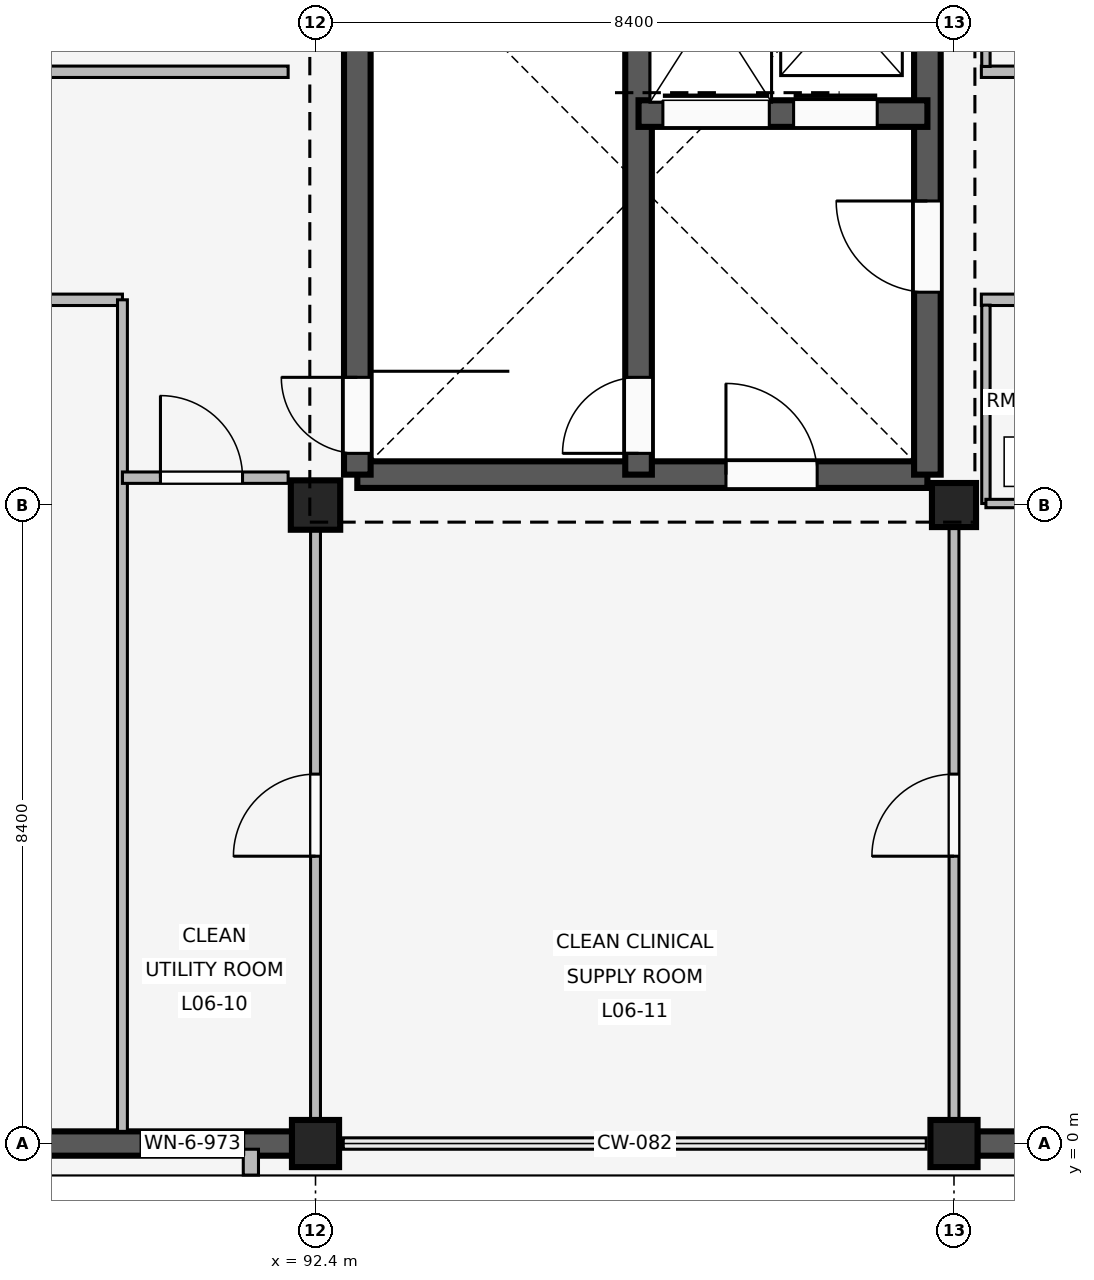
"""IFC4 building model, lengths in metres.
Left out: names, types, materials, properties, quantities, classifications, styles, units other than length and angle.
Written with IfcOpenShell. Run it as: python <this file> out.ifc"""

import sys

from ifc_helpers import new_model, si_unit, direction, frame, frame_2d, origin, origin_2d, place, context, subcontext, project, spatial, rectangle, extrude, element, fill, save


model = new_model("IFC4")
c1 = context("Model", 3, precision=1e-05, world=origin(), true_north=direction((0.0, 1.0)))
c2 = subcontext(c1, "Body", "Model", "MODEL_VIEW")
j1 = project(units=[si_unit("LENGTHUNIT", "METRE"), si_unit("PLANEANGLEUNIT", "RADIAN")], contexts=[c1])
p1 = place(None, origin())
s1 = spatial("IfcSite", under=j1, at=p1, CompositionType="ELEMENT")
p2 = place(p1, origin())
s2 = spatial("IfcBuilding", under=s1, at=p2, CompositionType="ELEMENT")
p3 = place(p2, frame((0.0, 0.0, 24.6)))
s3 = spatial("IfcBuildingStorey", under=s2, at=p3, CompositionType="ELEMENT", Elevation=24.6)
p4 = place(p3, frame((92.4, 0.0, 0.0), z_axis=(0.0, 0.0, 1.0), x_axis=(1.0, 0.0, 0.0)))
e1 = element("IfcColumn", 1, at=p4, inside=s3, PredefinedType="COLUMN", context=c2, shape_type="SweptSolid", body=[
    extrude(rectangle(XDim=0.62, YDim=0.62, at=origin_2d()), origin(), (0.0, 0.0, 1.0), 4.2),
])
p5 = place(p3, frame((92.4, 8.4, 0.0), z_axis=(0.0, 0.0, 1.0), x_axis=(1.0, 0.0, 0.0)))
e2 = element("IfcColumn", 2, at=p5, inside=s3, PredefinedType="COLUMN", context=c2, shape_type="SweptSolid", body=[
    extrude(rectangle(XDim=0.65, YDim=0.65, at=origin_2d()), origin(), (0.0, 0.0, 1.0), 4.2),
])
p6 = place(p3, frame((100.8, 0.0, 0.0), z_axis=(0.0, 0.0, 1.0), x_axis=(1.0, 0.0, 0.0)))
e3 = element("IfcColumn", 3, at=p6, inside=s3, PredefinedType="COLUMN", context=c2, shape_type="SweptSolid", body=[
    extrude(rectangle(XDim=0.62, YDim=0.62, at=origin_2d()), origin(), (0.0, 0.0, 1.0), 4.2),
])
p7 = place(p3, frame((100.8, 8.4, 0.0), z_axis=(0.0, 0.0, 1.0), x_axis=(1.0, 0.0, 0.0)))
e4 = element("IfcColumn", 4, at=p7, inside=s3, PredefinedType="COLUMN", context=c2, shape_type="SweptSolid", body=[
    extrude(rectangle(XDim=0.58, YDim=0.58, at=origin_2d()), origin(), (0.0, 0.0, 1.0), 4.2),
])
p8 = place(p3, frame((92.095, 0.0, 0.0), z_axis=(0.0, 0.0, 1.0), x_axis=(-1.0, 0.0, 0.0)))
e5 = element("IfcWall", 5, at=p8, inside=s3, PredefinedType="SOLIDWALL", context=c2, shape_type="SweptSolid", body=[
    extrude(rectangle(XDim=7.79, YDim=0.32, at=frame_2d((3.895, 0.0))), origin(), (0.0, 0.0, 1.0), 3.34),
])
p9 = place(p8, frame((0.64, 0.0, 0.85)))
e6 = element("IfcOpeningElement", 6, at=p9, cuts=e5, PredefinedType="OPENING", context=c2, shape_type="SweptSolid", body=[
    extrude(rectangle(XDim=1.35, YDim=1.55, at=frame_2d((0.675, 0.775))), frame((0.0, 0.17, 0.0), z_axis=(0.0, -1.0, 0.0), x_axis=(1.0, 0.0, 0.0)), (0.0, 0.0, 1.0), 0.34),
])
p10 = place(p8, frame((5.323, 0.0, 0.85)))
e7 = element("IfcOpeningElement", 7, at=p10, cuts=e5, PredefinedType="OPENING", context=c2, shape_type="SweptSolid", body=[
    extrude(rectangle(XDim=1.35, YDim=1.55, at=frame_2d((0.675, 0.775))), frame((0.0, 0.17, 0.0), z_axis=(0.0, -1.0, 0.0), x_axis=(1.0, 0.0, 0.0)), (0.0, 0.0, 1.0), 0.34),
])
p11 = place(p3, frame((91.55, -0.075, 0.0), z_axis=(0.0, 0.0, 1.0), x_axis=(0.0, -1.0, 0.0)))
e8 = element("IfcWall", 8, at=p11, inside=s3, PredefinedType="ELEMENTEDWALL", context=c2, shape_type="SweptSolid", body=[
    extrude(rectangle(XDim=0.34, YDim=0.2, at=frame_2d((0.17, 0.0))), origin(), (0.0, 0.0, 1.0), 3.32),
])
p12 = place(p3, frame((108.895, 0.0, 0.0), z_axis=(0.0, 0.0, 1.0), x_axis=(-1.0, 0.0, 0.0)))
e9 = element("IfcWall", 9, at=p12, inside=s3, PredefinedType="SOLIDWALL", context=c2, shape_type="SweptSolid", body=[
    extrude(rectangle(XDim=7.79, YDim=0.32, at=frame_2d((3.895, 0.0))), origin(), (0.0, 0.0, 1.0), 3.34),
])
p13 = place(p12, frame((1.417, 0.0, 0.85)))
e10 = element("IfcOpeningElement", 10, at=p13, cuts=e9, PredefinedType="OPENING", context=c2, shape_type="SweptSolid", body=[
    extrude(rectangle(XDim=0.75, YDim=1.85, at=frame_2d((0.375, 0.925))), frame((0.0, 0.17, 0.0), z_axis=(0.0, -1.0, 0.0), x_axis=(1.0, 0.0, 0.0)), (0.0, 0.0, 1.0), 0.34),
])
p14 = place(p12, frame((5.623, 0.0, 0.85)))
e11 = element("IfcOpeningElement", 11, at=p14, cuts=e9, PredefinedType="OPENING", context=c2, shape_type="SweptSolid", body=[
    extrude(rectangle(XDim=0.75, YDim=1.85, at=frame_2d((0.375, 0.925))), frame((0.0, 0.17, 0.0), z_axis=(0.0, -1.0, 0.0), x_axis=(1.0, 0.0, 0.0)), (0.0, 0.0, 1.0), 0.34),
])
p15 = place(p3, frame((92.95, 8.8, 0.0), z_axis=(0.0, 0.0, 1.0), x_axis=(1.0, 0.0, 0.0)))
e12 = element("IfcWall", 12, at=p15, inside=s3, PredefinedType="SHEAR", context=c2, shape_type="SweptSolid", body=[
    extrude(rectangle(XDim=7.5, YDim=0.35, at=frame_2d((3.75, 0.0))), origin(), (0.0, 0.0, 1.0), 3.92),
])
p16 = place(p15, frame((4.85, 0.0, 0.0)))
e13 = element("IfcOpeningElement", 13, at=p16, cuts=e12, PredefinedType="OPENING", context=c2, shape_type="SweptSolid", body=[
    extrude(rectangle(XDim=1.2, YDim=2.2, at=frame_2d((0.6, 1.1))), frame((0.0, 0.185, 0.0), z_axis=(0.0, -1.0, 0.0), x_axis=(1.0, 0.0, 0.0)), (0.0, 0.0, 1.0), 0.37),
])
p17 = place(p3, frame((92.95, 8.8, 0.0), z_axis=(0.0, 0.0, 1.0), x_axis=(0.0, 1.0, 0.0)))
e14 = element("IfcWall", 14, at=p17, inside=s3, PredefinedType="SHEAR", context=c2, shape_type="SweptSolid", body=[
    extrude(rectangle(XDim=7.55, YDim=0.35, at=frame_2d((3.775, 0.0))), origin(), (0.0, 0.0, 1.0), 3.92),
])
p18 = place(p17, frame((0.28, 0.0, 0.0)))
e15 = element("IfcOpeningElement", 15, at=p18, cuts=e14, PredefinedType="OPENING", context=c2, shape_type="SweptSolid", body=[
    extrude(rectangle(XDim=1.0, YDim=2.15, at=frame_2d((0.5, 1.075))), frame((0.0, 0.185, 0.0), z_axis=(0.0, -1.0, 0.0), x_axis=(1.0, 0.0, 0.0)), (0.0, 0.0, 1.0), 0.37),
])
p19 = place(p3, frame((100.45, 8.8, 0.0), z_axis=(0.0, 0.0, 1.0), x_axis=(0.0, 1.0, 0.0)))
e16 = element("IfcWall", 16, at=p19, inside=s3, PredefinedType="SHEAR", context=c2, shape_type="SweptSolid", body=[
    extrude(rectangle(XDim=7.55, YDim=0.35, at=frame_2d((3.775, 0.0))), origin(), (0.0, 0.0, 1.0), 3.92),
])
p20 = place(p19, frame((2.4, 0.0, 0.0)))
e17 = element("IfcOpeningElement", 17, at=p20, cuts=e16, PredefinedType="OPENING", context=c2, shape_type="SweptSolid", body=[
    extrude(rectangle(XDim=1.2, YDim=2.2, at=frame_2d((0.6, 1.1))), frame((0.0, 0.185, 0.0), z_axis=(0.0, -1.0, 0.0), x_axis=(1.0, 0.0, 0.0)), (0.0, 0.0, 1.0), 0.37),
])
p21 = place(p3, frame((96.65, 8.8, 0.0), z_axis=(0.0, 0.0, 1.0), x_axis=(0.0, 1.0, 0.0)))
e18 = element("IfcWall", 18, at=p21, inside=s3, PredefinedType="SHEAR", context=c2, shape_type="SweptSolid", body=[
    extrude(rectangle(XDim=7.55, YDim=0.35, at=frame_2d((3.775, 0.0))), origin(), (0.0, 0.0, 1.0), 3.92),
])
p22 = place(p21, frame((0.28, 0.0, 0.0)))
e19 = element("IfcOpeningElement", 19, at=p22, cuts=e18, PredefinedType="OPENING", context=c2, shape_type="SweptSolid", body=[
    extrude(rectangle(XDim=1.0, YDim=2.15, at=frame_2d((0.5, 1.075))), frame((0.0, 0.185, 0.0), z_axis=(0.0, -1.0, 0.0), x_axis=(1.0, 0.0, 0.0)), (0.0, 0.0, 1.0), 0.37),
])
p23 = place(p3, frame((96.65, 13.55, 0.0), z_axis=(0.0, 0.0, 1.0), x_axis=(1.0, 0.0, 0.0)))
e20 = element("IfcWall", 20, at=p23, inside=s3, PredefinedType="SHEAR", context=c2, shape_type="SweptSolid", body=[
    extrude(rectangle(XDim=3.8, YDim=0.35, at=frame_2d((1.9, 0.0))), origin(), (0.0, 0.0, 1.0), 3.92),
])
p24 = place(p23, frame((0.32, 0.0, 0.0)))
e21 = element("IfcOpeningElement", 21, at=p24, cuts=e20, PredefinedType="OPENING", context=c2, shape_type="SweptSolid", body=[
    extrude(rectangle(XDim=1.4, YDim=2.25, at=frame_2d((0.7, 1.125))), frame((0.0, 0.185, 0.0), z_axis=(0.0, -1.0, 0.0), x_axis=(1.0, 0.0, 0.0)), (0.0, 0.0, 1.0), 0.37),
])
p25 = place(p23, frame((2.04, 0.0, 0.0)))
e22 = element("IfcOpeningElement", 22, at=p25, cuts=e20, PredefinedType="OPENING", context=c2, shape_type="SweptSolid", body=[
    extrude(rectangle(XDim=1.1, YDim=2.15, at=frame_2d((0.55, 1.075))), frame((0.0, 0.185, 0.0), z_axis=(0.0, -1.0, 0.0), x_axis=(1.0, 0.0, 0.0)), (0.0, 0.0, 1.0), 0.37),
])
p26 = place(p3, frame((84.08, 11.1, 0.0), z_axis=(0.0, 0.0, 1.0), x_axis=(1.0, 0.0, 0.0)))
e23 = element("IfcWall", 23, at=p26, inside=s3, PredefinedType="PARTITIONING", context=c2, shape_type="SweptSolid", body=[
    extrude(rectangle(XDim=5.78, YDim=0.15, at=frame_2d((2.89, 0.0))), origin(), (0.0, 0.0, 1.0), 3.32),
])
p27 = place(p26, frame((2.38, 0.0, 0.0)))
e24 = element("IfcOpeningElement", 24, at=p27, cuts=e23, PredefinedType="OPENING", context=c2, shape_type="SweptSolid", body=[
    extrude(rectangle(XDim=1.25, YDim=2.2, at=frame_2d((0.625, 1.1))), frame((0.0, 0.085, 0.0), z_axis=(0.0, -1.0, 0.0), x_axis=(1.0, 0.0, 0.0)), (0.0, 0.0, 1.0), 0.17),
])
p28 = place(p3, frame((89.86, 0.16, 0.0), z_axis=(0.0, 0.0, 1.0), x_axis=(0.0, 1.0, 0.0)))
e25 = element("IfcWall", 25, at=p28, inside=s3, PredefinedType="PARTITIONING", context=c2, shape_type="SweptSolid", body=[
    extrude(rectangle(XDim=10.94, YDim=0.13, at=frame_2d((5.47, 0.0))), origin(), (0.0, 0.0, 1.0), 3.32),
])
p29 = place(p3, frame((89.86, 8.76, 0.0), z_axis=(0.0, 0.0, 1.0), x_axis=(1.0, 0.0, 0.0)))
e26 = element("IfcWall", 26, at=p29, inside=s3, PredefinedType="PARTITIONING", context=c2, shape_type="SweptSolid", body=[
    extrude(rectangle(XDim=2.18, YDim=0.15, at=frame_2d((1.09, 0.0))), origin(), (0.0, 0.0, 1.0), 3.32),
])
p30 = place(p29, frame((0.5, 0.0, 0.0)))
e27 = element("IfcOpeningElement", 27, at=p30, cuts=e26, PredefinedType="OPENING", context=c2, shape_type="SweptSolid", body=[
    extrude(rectangle(XDim=1.08, YDim=2.15, at=frame_2d((0.54, 1.075))), frame((0.0, 0.085, 0.0), z_axis=(0.0, -1.0, 0.0), x_axis=(1.0, 0.0, 0.0)), (0.0, 0.0, 1.0), 0.17),
])
p31 = place(p3, frame((92.04, 14.1, 0.0), z_axis=(0.0, 0.0, 1.0), x_axis=(-1.0, 0.0, 0.0)))
e28 = element("IfcWall", 28, at=p31, inside=s3, PredefinedType="PARTITIONING", context=c2, shape_type="SweptSolid", body=[
    extrude(rectangle(XDim=7.96, YDim=0.15, at=frame_2d((3.98, 0.0))), origin(), (0.0, 0.0, 1.0), 3.32),
])
p32 = place(p31, frame((3.355, 0.0, 0.0)))
e29 = element("IfcOpeningElement", 29, at=p32, cuts=e28, PredefinedType="OPENING", context=c2, shape_type="SweptSolid", body=[
    extrude(rectangle(XDim=1.25, YDim=2.2, at=frame_2d((0.625, 1.1))), frame((0.0, 0.085, 0.0), z_axis=(0.0, -1.0, 0.0), x_axis=(1.0, 0.0, 0.0)), (0.0, 0.0, 1.0), 0.17),
])
p33 = place(p3, frame((92.4, 0.14, 0.0), z_axis=(0.0, 0.0, 1.0), x_axis=(0.0, 1.0, 0.0)))
e30 = element("IfcWall", 30, at=p33, inside=s3, PredefinedType="PARTITIONING", context=c2, shape_type="SweptSolid", body=[
    extrude(rectangle(XDim=8.21, YDim=0.13, at=frame_2d((4.105, 0.0))), origin(), (0.0, 0.0, 1.0), 3.32),
])
p34 = place(p33, frame((3.64, 0.0, 0.0)))
e31 = element("IfcOpeningElement", 31, at=p34, cuts=e30, PredefinedType="OPENING", context=c2, shape_type="SweptSolid", body=[
    extrude(rectangle(XDim=1.08, YDim=2.15, at=frame_2d((0.54, 1.075))), frame((0.0, 0.075, 0.0), z_axis=(0.0, -1.0, 0.0), x_axis=(1.0, 0.0, 0.0)), (0.0, 0.0, 1.0), 0.15),
])
p35 = place(p3, frame((100.8, 0.14, 0.0), z_axis=(0.0, 0.0, 1.0), x_axis=(0.0, 1.0, 0.0)))
e32 = element("IfcWall", 32, at=p35, inside=s3, PredefinedType="PARTITIONING", context=c2, shape_type="SweptSolid", body=[
    extrude(rectangle(XDim=8.21, YDim=0.13, at=frame_2d((4.105, 0.0))), origin(), (0.0, 0.0, 1.0), 3.32),
])
p36 = place(p35, frame((3.64, 0.0, 0.0)))
e33 = element("IfcOpeningElement", 33, at=p36, cuts=e32, PredefinedType="OPENING", context=c2, shape_type="SweptSolid", body=[
    extrude(rectangle(XDim=1.08, YDim=2.15, at=frame_2d((0.54, 1.075))), frame((0.0, 0.075, 0.0), z_axis=(0.0, -1.0, 0.0), x_axis=(1.0, 0.0, 0.0)), (0.0, 0.0, 1.0), 0.15),
])
p37 = place(p3, frame((101.16, 11.1, 0.0), z_axis=(0.0, 0.0, 1.0), x_axis=(1.0, 0.0, 0.0)))
e34 = element("IfcWall", 34, at=p37, inside=s3, PredefinedType="PARTITIONING", context=c2, shape_type="SweptSolid", body=[
    extrude(rectangle(XDim=7.96, YDim=0.15, at=frame_2d((3.98, 0.0))), origin(), (0.0, 0.0, 1.0), 3.32),
])
p38 = place(p37, frame((2.25, 0.0, 0.0)))
e35 = element("IfcOpeningElement", 35, at=p38, cuts=e34, PredefinedType="OPENING", context=c2, shape_type="SweptSolid", body=[
    extrude(rectangle(XDim=1.28, YDim=2.2, at=frame_2d((0.64, 1.1))), frame((0.0, 0.085, 0.0), z_axis=(0.0, -1.0, 0.0), x_axis=(1.0, 0.0, 0.0)), (0.0, 0.0, 1.0), 0.17),
])
p39 = place(p37, frame((5.95, 0.0, 0.0)))
e36 = element("IfcOpeningElement", 36, at=p39, cuts=e34, PredefinedType="OPENING", context=c2, shape_type="SweptSolid", body=[
    extrude(rectangle(XDim=1.28, YDim=2.2, at=frame_2d((0.64, 1.1))), frame((0.0, 0.085, 0.0), z_axis=(0.0, -1.0, 0.0), x_axis=(1.0, 0.0, 0.0)), (0.0, 0.0, 1.0), 0.17),
])
p40 = place(p3, frame((101.22, 8.42, 0.0), z_axis=(0.0, 0.0, 1.0), x_axis=(0.0, 1.0, 0.0)))
e37 = element("IfcWall", 37, at=p40, inside=s3, PredefinedType="PARTITIONING", context=c2, shape_type="SweptSolid", body=[
    extrude(rectangle(XDim=2.61, YDim=0.11, at=frame_2d((1.305, 0.0))), origin(), (0.0, 0.0, 1.0), 3.32),
])
p41 = place(p3, frame((101.22, 8.42, 0.0), z_axis=(0.0, 0.0, 1.0), x_axis=(1.0, 0.0, 0.0)))
e38 = element("IfcWall", 38, at=p41, inside=s3, PredefinedType="PARTITIONING", context=c2, shape_type="SweptSolid", body=[
    extrude(rectangle(XDim=1.98, YDim=0.11, at=frame_2d((0.99, 0.0))), origin(), (0.0, 0.0, 1.0), 3.32),
])
p42 = place(p41, frame((0.54, 0.0, 0.0)))
e39 = element("IfcOpeningElement", 39, at=p42, cuts=e38, PredefinedType="OPENING", context=c2, shape_type="SweptSolid", body=[
    extrude(rectangle(XDim=0.9, YDim=2.1, at=frame_2d((0.45, 1.05))), frame((0.0, 0.065, 0.0), z_axis=(0.0, -1.0, 0.0), x_axis=(1.0, 0.0, 0.0)), (0.0, 0.0, 1.0), 0.13),
])
p43 = place(p3, frame((109.12, 14.1, 0.0), z_axis=(0.0, 0.0, 1.0), x_axis=(-1.0, 0.0, 0.0)))
e40 = element("IfcWall", 40, at=p43, inside=s3, PredefinedType="PARTITIONING", context=c2, shape_type="SweptSolid", body=[
    extrude(rectangle(XDim=7.96, YDim=0.15, at=frame_2d((3.98, 0.0))), origin(), (0.0, 0.0, 1.0), 3.32),
])
p44 = place(p43, frame((0.73, 0.0, 0.0)))
e41 = element("IfcOpeningElement", 41, at=p44, cuts=e40, PredefinedType="OPENING", context=c2, shape_type="SweptSolid", body=[
    extrude(rectangle(XDim=1.28, YDim=2.2, at=frame_2d((0.64, 1.1))), frame((0.0, 0.085, 0.0), z_axis=(0.0, -1.0, 0.0), x_axis=(1.0, 0.0, 0.0)), (0.0, 0.0, 1.0), 0.17),
])
p45 = place(p43, frame((4.43, 0.0, 0.0)))
e42 = element("IfcOpeningElement", 42, at=p45, cuts=e40, PredefinedType="OPENING", context=c2, shape_type="SweptSolid", body=[
    extrude(rectangle(XDim=1.28, YDim=2.2, at=frame_2d((0.64, 1.1))), frame((0.0, 0.085, 0.0), z_axis=(0.0, -1.0, 0.0), x_axis=(1.0, 0.0, 0.0)), (0.0, 0.0, 1.0), 0.17),
])
p46 = place(p3, frame((101.22, 14.17, 0.0), z_axis=(0.0, 0.0, 1.0), x_axis=(0.0, 1.0, 0.0)))
e43 = element("IfcWall", 43, at=p46, inside=s3, PredefinedType="PARTITIONING", context=c2, shape_type="SweptSolid", body=[
    extrude(rectangle(XDim=2.61, YDim=0.11, at=frame_2d((1.305, 0.0))), origin(), (0.0, 0.0, 1.0), 3.32),
])
p47 = place(p9, origin())
e44 = element("IfcWindow", 44, at=p47, inside=s3, PartitioningType="SINGLE_PANEL", PredefinedType="WINDOW", context=c2, shape_type="SweptSolid", body=[
    extrude(rectangle(XDim=1.35, YDim=1.55, at=frame_2d((0.675, 0.775))), frame((0.0, 0.03, 0.0), z_axis=(0.0, -1.0, 0.0), x_axis=(1.0, 0.0, 0.0)), (0.0, 0.0, 1.0), 0.06),
])
fill(e6, e44)
p48 = place(p20, origin())
e45 = element("IfcDoor", 45, at=p48, inside=s3, OperationType="SINGLE_SWING_RIGHT", PredefinedType="DOOR", context=c2, shape_type="SweptSolid", body=[
    extrude(rectangle(XDim=1.2, YDim=2.2, at=frame_2d((0.6, 1.1))), frame((0.0, 0.025, 0.0), z_axis=(0.0, -1.0, 0.0), x_axis=(1.0, 0.0, 0.0)), (0.0, 0.0, 1.0), 0.05),
])
fill(e17, e45)
p49 = place(p16, origin())
e46 = element("IfcDoor", 46, at=p49, inside=s3, OperationType="SINGLE_SWING_LEFT", PredefinedType="DOOR", context=c2, shape_type="SweptSolid", body=[
    extrude(rectangle(XDim=1.2, YDim=2.2, at=frame_2d((0.6, 1.1))), frame((0.0, 0.025, 0.0), z_axis=(0.0, -1.0, 0.0), x_axis=(1.0, 0.0, 0.0)), (0.0, 0.0, 1.0), 0.05),
])
fill(e13, e46)
p50 = place(p18, origin())
e47 = element("IfcDoor", 47, at=p50, inside=s3, OperationType="SINGLE_SWING_RIGHT", PredefinedType="DOOR", context=c2, shape_type="SweptSolid", body=[
    extrude(rectangle(XDim=1.0, YDim=2.15, at=frame_2d((0.5, 1.075))), frame((0.0, 0.025, 0.0), z_axis=(0.0, -1.0, 0.0), x_axis=(1.0, 0.0, 0.0)), (0.0, 0.0, 1.0), 0.05),
])
fill(e15, e47)
p51 = place(p22, origin())
e48 = element("IfcDoor", 48, at=p51, inside=s3, OperationType="SINGLE_SWING_LEFT", PredefinedType="DOOR", context=c2, shape_type="SweptSolid", body=[
    extrude(rectangle(XDim=1.0, YDim=2.15, at=frame_2d((0.5, 1.075))), frame((0.0, 0.025, 0.0), z_axis=(0.0, -1.0, 0.0), x_axis=(1.0, 0.0, 0.0)), (0.0, 0.0, 1.0), 0.05),
])
fill(e19, e48)
p52 = place(p24, origin())
e49 = element("IfcDoor", 49, at=p52, inside=s3, OperationType="SLIDING_TO_LEFT", PredefinedType="DOOR", context=c2, shape_type="SweptSolid", body=[
    extrude(rectangle(XDim=1.4, YDim=2.25, at=frame_2d((0.7, 1.125))), frame((0.0, 0.025, 0.0), z_axis=(0.0, -1.0, 0.0), x_axis=(1.0, 0.0, 0.0)), (0.0, 0.0, 1.0), 0.05),
])
fill(e21, e49)
p53 = place(p25, origin())
e50 = element("IfcDoor", 50, at=p53, inside=s3, OperationType="SLIDING_TO_LEFT", PredefinedType="DOOR", context=c2, shape_type="SweptSolid", body=[
    extrude(rectangle(XDim=1.1, YDim=2.15, at=frame_2d((0.55, 1.075))), frame((0.0, 0.025, 0.0), z_axis=(0.0, -1.0, 0.0), x_axis=(1.0, 0.0, 0.0)), (0.0, 0.0, 1.0), 0.05),
])
fill(e22, e50)
p54 = place(p30, origin())
e51 = element("IfcDoor", 51, at=p54, inside=s3, OperationType="SINGLE_SWING_LEFT", PredefinedType="DOOR", context=c2, shape_type="SweptSolid", body=[
    extrude(rectangle(XDim=1.08, YDim=2.15, at=frame_2d((0.54, 1.075))), frame((0.0, 0.025, 0.0), z_axis=(0.0, -1.0, 0.0), x_axis=(1.0, 0.0, 0.0)), (0.0, 0.0, 1.0), 0.05),
])
fill(e27, e51)
p55 = place(p34, origin())
e52 = element("IfcDoor", 52, at=p55, inside=s3, OperationType="SINGLE_SWING_LEFT", PredefinedType="DOOR", context=c2, shape_type="SweptSolid", body=[
    extrude(rectangle(XDim=1.08, YDim=2.15, at=frame_2d((0.54, 1.075))), frame((0.0, 0.025, 0.0), z_axis=(0.0, -1.0, 0.0), x_axis=(1.0, 0.0, 0.0)), (0.0, 0.0, 1.0), 0.05),
])
fill(e31, e52)
p56 = place(p36, origin())
e53 = element("IfcDoor", 53, at=p56, inside=s3, OperationType="SINGLE_SWING_LEFT", PredefinedType="DOOR", context=c2, shape_type="SweptSolid", body=[
    extrude(rectangle(XDim=1.08, YDim=2.15, at=frame_2d((0.54, 1.075))), frame((0.0, 0.025, 0.0), z_axis=(0.0, -1.0, 0.0), x_axis=(1.0, 0.0, 0.0)), (0.0, 0.0, 1.0), 0.05),
])
fill(e33, e53)
save(model, sys.argv[1])
